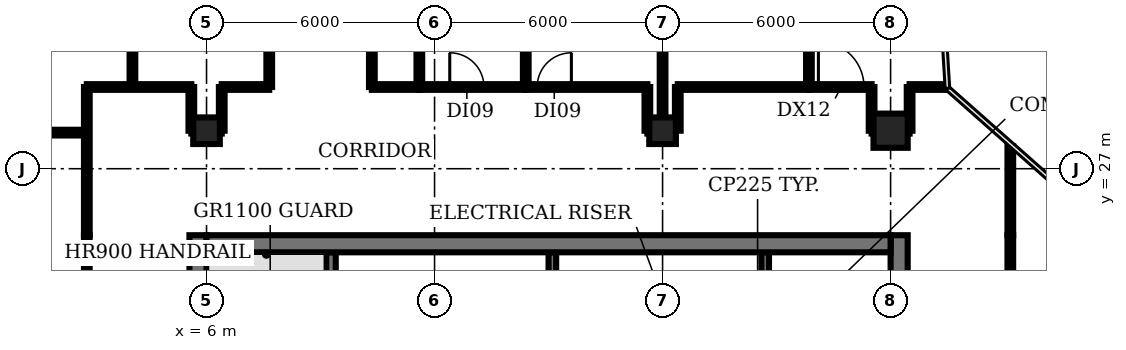
"""IFC4 building model, lengths in metres.
Left out: names, types, materials, properties, quantities, classifications, styles, units other than length and angle.
Written with IfcOpenShell. Run it as: python <this file> out.ifc"""

import sys

from ifc_helpers import new_model, si_unit, direction, frame, frame_2d, origin, origin_2d, place, context, subcontext, project, spatial, rectangle, circle, extrude, element, fill, save


model = new_model("IFC4")
c1 = context("Model", 3, precision=1e-05, world=origin(), true_north=direction((0.0, 1.0)))
c2 = subcontext(c1, "Body", "Model", "MODEL_VIEW")
j1 = project(units=[si_unit("LENGTHUNIT", "METRE"), si_unit("PLANEANGLEUNIT", "RADIAN")], contexts=[c1])
p1 = place(None, origin())
s1 = spatial("IfcSite", under=j1, at=p1, CompositionType="ELEMENT")
p2 = place(p1, origin())
s2 = spatial("IfcBuilding", under=s1, at=p2, CompositionType="ELEMENT")
p3 = place(p2, frame((0.0, 0.0, 213.8)))
s3 = spatial("IfcBuildingStorey", under=s2, at=p3, CompositionType="ELEMENT", Elevation=213.8)
for number, where, z_axis, x_axis in (
    (1, (6.0, 28.0, 0.0), (0.0, 0.0, 1.0), (1.0, 0.0, 0.0)),
    (2, (18.0, 28.0, 0.0), (0.0, 0.0, 1.0), (1.0, 0.0, 0.0)),
):
    element("IfcColumn", number, at=place(p3, frame(where, z_axis=z_axis, x_axis=x_axis)), inside=s3, PredefinedType="COLUMN", context=c2, shape_type="SweptSolid", body=[
        extrude(rectangle(XDim=0.7, YDim=0.7, at=origin_2d()), origin(), (0.0, 0.0, 1.0), 3.85),
    ])
p4 = place(p3, frame((24.0, 28.0, 0.0), z_axis=(0.0, 0.0, 1.0), x_axis=(1.0, 0.0, 0.0)))
e3 = element("IfcColumn", 3, at=p4, inside=s3, PredefinedType="COLUMN", context=c2, shape_type="SweptSolid", body=[
    extrude(circle(Radius=0.45, at=origin_2d()), origin(), (0.0, 0.0, 1.0), 3.85),
])
p5 = place(p3, frame((9.275, 18.375, 0.0), z_axis=(0.0, 0.0, 1.0), x_axis=(0.0, 1.0, 0.0)))
e4 = element("IfcWall", 4, at=p5, inside=s3, PredefinedType="SHEAR", context=c2, shape_type="SweptSolid", body=[
    extrude(rectangle(XDim=6.425, YDim=0.25, at=frame_2d((3.212, 0.0))), origin(), (0.0, 0.0, 1.0), 3.85),
])
for number, where, z_axis, x_axis in (
    (5, (15.1, 22.9, 0.0), (0.0, 0.0, 1.0), (0.0, 1.0, 0.0)),
    (6, (20.7, 22.9, 0.0), (0.0, 0.0, 1.0), (0.0, 1.0, 0.0)),
):
    element("IfcWall", number, at=place(p3, frame(where, z_axis=z_axis, x_axis=x_axis)), inside=s3, PredefinedType="SHEAR", context=c2, shape_type="SweptSolid", body=[
        extrude(rectangle(XDim=1.9, YDim=0.2, at=frame_2d((0.95, 0.0))), origin(), (0.0, 0.0, 1.0), 3.85),
    ])
p6 = place(p3, frame((5.775, 4.42, 0.0), z_axis=(0.0, 0.0, 1.0), x_axis=(0.0, 1.0, 0.0)))
e7 = element("IfcWall", 7, at=p6, inside=s3, PredefinedType="SHEAR", context=c2, shape_type="SweptSolid", body=[
    extrude(rectangle(XDim=20.83, YDim=0.45, at=frame_2d((10.415, 0.0))), origin(), (0.0, 0.0, 1.0), 3.85),
])
p7 = place(p6, frame((1.23, 0.0, 0.0)))
e8 = element("IfcOpeningElement", 8, at=p7, cuts=e7, PredefinedType="OPENING", context=c2, shape_type="SweptSolid", body=[
    extrude(rectangle(XDim=1.5, YDim=2.1, at=frame_2d((0.75, 1.05))), frame((0.0, 0.235, 0.0), z_axis=(0.0, -1.0, 0.0), x_axis=(1.0, 0.0, 0.0)), (0.0, 0.0, 1.0), 0.47),
])
p8 = place(p6, frame((7.68, 0.0, 0.0)))
e9 = element("IfcOpeningElement", 9, at=p8, cuts=e7, PredefinedType="OPENING", context=c2, shape_type="SweptSolid", body=[
    extrude(rectangle(XDim=1.2, YDim=2.1, at=frame_2d((0.6, 1.05))), frame((0.0, 0.235, 0.0), z_axis=(0.0, -1.0, 0.0), x_axis=(1.0, 0.0, 0.0)), (0.0, 0.0, 1.0), 0.47),
])
p9 = place(p6, frame((14.23, 0.0, 0.0)))
e10 = element("IfcOpeningElement", 10, at=p9, cuts=e7, PredefinedType="OPENING", context=c2, shape_type="SweptSolid", body=[
    extrude(rectangle(XDim=1.2, YDim=2.1, at=frame_2d((0.6, 1.05))), frame((0.0, 0.235, 0.0), z_axis=(0.0, -1.0, 0.0), x_axis=(1.0, 0.0, 0.0)), (0.0, 0.0, 1.0), 0.47),
])
p10 = place(p3, frame((24.225, 25.25, 0.0), z_axis=(0.0, 0.0, 1.0), x_axis=(0.0, -1.0, 0.0)))
e11 = element("IfcWall", 11, at=p10, inside=s3, PredefinedType="SHEAR", context=c2, shape_type="SweptSolid", body=[
    extrude(rectangle(XDim=20.83, YDim=0.45, at=frame_2d((10.415, 0.0))), origin(), (0.0, 0.0, 1.0), 3.85),
])
p11 = place(p10, frame((18.1, 0.0, 0.0)))
e12 = element("IfcOpeningElement", 12, at=p11, cuts=e11, PredefinedType="OPENING", context=c2, shape_type="SweptSolid", body=[
    extrude(rectangle(XDim=1.5, YDim=2.1, at=frame_2d((0.75, 1.05))), frame((0.0, 0.235, 0.0), z_axis=(0.0, -1.0, 0.0), x_axis=(1.0, 0.0, 0.0)), (0.0, 0.0, 1.0), 0.47),
])
p12 = place(p10, frame((12.0, 0.0, 0.0)))
e13 = element("IfcOpeningElement", 13, at=p12, cuts=e11, PredefinedType="OPENING", context=c2, shape_type="SweptSolid", body=[
    extrude(rectangle(XDim=0.9, YDim=2.1, at=frame_2d((0.45, 1.05))), frame((0.0, 0.235, 0.0), z_axis=(0.0, -1.0, 0.0), x_axis=(1.0, 0.0, 0.0)), (0.0, 0.0, 1.0), 0.47),
])
p13 = place(p10, frame((6.0, 0.0, 0.0)))
e14 = element("IfcOpeningElement", 14, at=p13, cuts=e11, PredefinedType="OPENING", context=c2, shape_type="SweptSolid", body=[
    extrude(rectangle(XDim=2.0, YDim=2.1, at=frame_2d((1.0, 1.05))), frame((0.0, 0.235, 0.0), z_axis=(0.0, -1.0, 0.0), x_axis=(1.0, 0.0, 0.0)), (0.0, 0.0, 1.0), 0.47),
])
p14 = place(p3, frame((6.0, 25.025, 0.0), z_axis=(0.0, 0.0, 1.0), x_axis=(1.0, 0.0, 0.0)))
e15 = element("IfcWall", 15, at=p14, inside=s3, PredefinedType="SHEAR", context=c2, shape_type="SweptSolid", body=[
    extrude(rectangle(XDim=18.0, YDim=0.45, at=frame_2d((9.0, 0.0))), origin(), (0.0, 0.0, 1.0), 3.85),
])
p15 = place(p3, frame((-0.965, 27.95, 0.0), z_axis=(0.0, 0.0, 1.0), x_axis=(1.0, 0.0, 0.0)))
e16 = element("IfcWall", 16, at=p15, inside=s3, PredefinedType="PARTITIONING", context=c2, shape_type="SweptSolid", body=[
    extrude(rectangle(XDim=3.815, YDim=0.15, at=frame_2d((1.908, 0.0))), origin(), (0.0, 0.0, 1.0), 2.88),
])
p16 = place(p3, frame((2.85, 5.77, 0.0), z_axis=(0.0, 0.0, 1.0), x_axis=(0.0, 1.0, 0.0)))
e17 = element("IfcWall", 17, at=p16, inside=s3, PredefinedType="PARTITIONING", context=c2, shape_type="SweptSolid", body=[
    extrude(rectangle(XDim=19.48, YDim=0.15, at=frame_2d((9.74, 0.0))), origin(), (0.0, 0.0, 1.0), 2.88),
])
p17 = place(p16, frame((8.48, 0.0, 0.0)))
e18 = element("IfcOpeningElement", 18, at=p17, cuts=e17, PredefinedType="OPENING", context=c2, shape_type="SweptSolid", body=[
    extrude(rectangle(XDim=1.2, YDim=2.1, at=frame_2d((0.6, 1.05))), frame((0.0, 0.085, 0.0), z_axis=(0.0, -1.0, 0.0), x_axis=(1.0, 0.0, 0.0)), (0.0, 0.0, 1.0), 0.17),
])
p18 = place(p3, frame((2.85, 25.25, 0.0), z_axis=(0.0, 0.0, 1.0), x_axis=(0.0, 1.0, 0.0)))
e19 = element("IfcWall", 19, at=p18, inside=s3, PredefinedType="PARTITIONING", context=c2, shape_type="SweptSolid", body=[
    extrude(rectangle(XDim=3.9, YDim=0.15, at=frame_2d((1.95, 0.0))), origin(), (0.0, 0.0, 1.0), 2.88),
])
p19 = place(p3, frame((2.85, 29.15, 0.0), z_axis=(0.0, 0.0, 1.0), x_axis=(1.0, 0.0, 0.0)))
e20 = element("IfcWall", 20, at=p19, inside=s3, PredefinedType="PARTITIONING", context=c2, shape_type="SweptSolid", body=[
    extrude(rectangle(XDim=2.75, YDim=0.15, at=frame_2d((1.375, 0.0))), origin(), (0.0, 0.0, 1.0), 2.88),
])
p20 = place(p3, frame((4.05, 29.15, 0.0), z_axis=(0.0, 0.0, 1.0), x_axis=(0.0, 1.0, 0.0)))
e21 = element("IfcWall", 21, at=p20, inside=s3, PredefinedType="PARTITIONING", context=c2, shape_type="SweptSolid", body=[
    extrude(rectangle(XDim=4.8, YDim=0.15, at=frame_2d((2.4, 0.0))), origin(), (0.0, 0.0, 1.0), 2.88),
])
p21 = place(p3, frame((5.6, 28.0, 0.0), z_axis=(0.0, 0.0, 1.0), x_axis=(0.0, 1.0, 0.0)))
e22 = element("IfcWall", 22, at=p21, inside=s3, PredefinedType="PARTITIONING", context=c2, shape_type="SweptSolid", body=[
    extrude(rectangle(XDim=1.15, YDim=0.15, at=frame_2d((0.575, 0.0))), origin(), (0.0, 0.0, 1.0), 2.88),
])
p22 = place(p3, frame((5.6, 28.0, 0.0), z_axis=(0.0, 0.0, 1.0), x_axis=(1.0, 0.0, 0.0)))
e23 = element("IfcWall", 23, at=p22, inside=s3, PredefinedType="PARTITIONING", context=c2, shape_type="SweptSolid", body=[
    extrude(rectangle(XDim=0.8, YDim=0.15, at=frame_2d((0.4, 0.0))), origin(), (0.0, 0.0, 1.0), 2.88),
])
p23 = place(p3, frame((6.4, 28.0, 0.0), z_axis=(0.0, 0.0, 1.0), x_axis=(0.0, 1.0, 0.0)))
e24 = element("IfcWall", 24, at=p23, inside=s3, PredefinedType="PARTITIONING", context=c2, shape_type="SweptSolid", body=[
    extrude(rectangle(XDim=1.15, YDim=0.15, at=frame_2d((0.575, 0.0))), origin(), (0.0, 0.0, 1.0), 2.88),
])
p24 = place(p3, frame((6.4, 29.15, 0.0), z_axis=(0.0, 0.0, 1.0), x_axis=(1.0, 0.0, 0.0)))
e25 = element("IfcWall", 25, at=p24, inside=s3, PredefinedType="PARTITIONING", context=c2, shape_type="SweptSolid", body=[
    extrude(rectangle(XDim=1.25, YDim=0.15, at=frame_2d((0.625, 0.0))), origin(), (0.0, 0.0, 1.0), 2.88),
])
p25 = place(p3, frame((7.65, 29.15, 0.0), z_axis=(0.0, 0.0, 1.0), x_axis=(0.0, 1.0, 0.0)))
e26 = element("IfcWall", 26, at=p25, inside=s3, PredefinedType="PARTITIONING", context=c2, shape_type="SweptSolid", body=[
    extrude(rectangle(XDim=4.8, YDim=0.15, at=frame_2d((2.4, 0.0))), origin(), (0.0, 0.0, 1.0), 2.88),
])
p26 = place(p25, frame((1.9, 0.0, 0.0)))
e27 = element("IfcOpeningElement", 27, at=p26, cuts=e26, PredefinedType="OPENING", context=c2, shape_type="SweptSolid", body=[
    extrude(rectangle(XDim=0.9, YDim=2.1, at=frame_2d((0.45, 1.05))), frame((0.0, 0.085, 0.0), z_axis=(0.0, -1.0, 0.0), x_axis=(1.0, 0.0, 0.0)), (0.0, 0.0, 1.0), 0.17),
])
p27 = place(p3, frame((10.35, 29.15, 0.0), z_axis=(0.0, 0.0, 1.0), x_axis=(0.0, 1.0, 0.0)))
e28 = element("IfcWall", 28, at=p27, inside=s3, PredefinedType="PARTITIONING", context=c2, shape_type="SweptSolid", body=[
    extrude(rectangle(XDim=4.8, YDim=0.15, at=frame_2d((2.4, 0.0))), origin(), (0.0, 0.0, 1.0), 2.88),
])
p28 = place(p3, frame((10.35, 29.15, 0.0), z_axis=(0.0, 0.0, 1.0), x_axis=(1.0, 0.0, 0.0)))
e29 = element("IfcWall", 29, at=p28, inside=s3, PredefinedType="PARTITIONING", context=c2, shape_type="SweptSolid", body=[
    extrude(rectangle(XDim=1.25, YDim=0.15, at=frame_2d((0.625, 0.0))), origin(), (0.0, 0.0, 1.0), 2.88),
])
p29 = place(p3, frame((11.6, 29.15, 0.0), z_axis=(0.0, 0.0, 1.0), x_axis=(0.0, 1.0, 0.0)))
e30 = element("IfcWall", 30, at=p29, inside=s3, PredefinedType="PARTITIONING", context=c2, shape_type="SweptSolid", body=[
    extrude(rectangle(XDim=4.72, YDim=0.15, at=frame_2d((2.36, 0.0))), origin(), (0.0, 0.0, 1.0), 2.88),
])
p30 = place(p3, frame((11.6, 29.15, 0.0), z_axis=(0.0, 0.0, 1.0), x_axis=(1.0, 0.0, 0.0)))
e31 = element("IfcWall", 31, at=p30, inside=s3, PredefinedType="PARTITIONING", context=c2, shape_type="SweptSolid", body=[
    extrude(rectangle(XDim=2.8, YDim=0.15, at=frame_2d((1.4, 0.0))), origin(), (0.0, 0.0, 1.0), 2.88),
])
p31 = place(p30, frame((0.8, 0.0, 0.0)))
e32 = element("IfcOpeningElement", 32, at=p31, cuts=e31, PredefinedType="OPENING", context=c2, shape_type="SweptSolid", body=[
    extrude(rectangle(XDim=0.9, YDim=2.1, at=frame_2d((0.45, 1.05))), frame((0.0, 0.085, 0.0), z_axis=(0.0, -1.0, 0.0), x_axis=(1.0, 0.0, 0.0)), (0.0, 0.0, 1.0), 0.17),
])
p32 = place(p3, frame((14.4, 29.15, 0.0), z_axis=(0.0, 0.0, 1.0), x_axis=(0.0, 1.0, 0.0)))
e33 = element("IfcWall", 33, at=p32, inside=s3, PredefinedType="PARTITIONING", context=c2, shape_type="SweptSolid", body=[
    extrude(rectangle(XDim=4.8, YDim=0.15, at=frame_2d((2.4, 0.0))), origin(), (0.0, 0.0, 1.0), 2.88),
])
p33 = place(p3, frame((14.4, 29.15, 0.0), z_axis=(0.0, 0.0, 1.0), x_axis=(1.0, 0.0, 0.0)))
e34 = element("IfcWall", 34, at=p33, inside=s3, PredefinedType="PARTITIONING", context=c2, shape_type="SweptSolid", body=[
    extrude(rectangle(XDim=3.2, YDim=0.15, at=frame_2d((1.6, 0.0))), origin(), (0.0, 0.0, 1.0), 2.88),
])
p34 = place(p33, frame((0.3, 0.0, 0.0)))
e35 = element("IfcOpeningElement", 35, at=p34, cuts=e34, PredefinedType="OPENING", context=c2, shape_type="SweptSolid", body=[
    extrude(rectangle(XDim=0.9, YDim=2.1, at=frame_2d((0.45, 1.05))), frame((0.0, 0.085, 0.0), z_axis=(0.0, -1.0, 0.0), x_axis=(1.0, 0.0, 0.0)), (0.0, 0.0, 1.0), 0.17),
])
p35 = place(p3, frame((17.6, 28.0, 0.0), z_axis=(0.0, 0.0, 1.0), x_axis=(0.0, 1.0, 0.0)))
e36 = element("IfcWall", 36, at=p35, inside=s3, PredefinedType="PARTITIONING", context=c2, shape_type="SweptSolid", body=[
    extrude(rectangle(XDim=1.15, YDim=0.15, at=frame_2d((0.575, 0.0))), origin(), (0.0, 0.0, 1.0), 2.88),
])
p36 = place(p3, frame((17.6, 28.0, 0.0), z_axis=(0.0, 0.0, 1.0), x_axis=(1.0, 0.0, 0.0)))
e37 = element("IfcWall", 37, at=p36, inside=s3, PredefinedType="PARTITIONING", context=c2, shape_type="SweptSolid", body=[
    extrude(rectangle(XDim=0.4, YDim=0.15, at=frame_2d((0.2, 0.0))), origin(), (0.0, 0.0, 1.0), 2.88),
])
p37 = place(p3, frame((18.0, 28.0, 0.0), z_axis=(0.0, 0.0, 1.0), x_axis=(0.0, 1.0, 0.0)))
e38 = element("IfcWall", 38, at=p37, inside=s3, PredefinedType="PARTITIONING", context=c2, shape_type="SweptSolid", body=[
    extrude(rectangle(XDim=5.95, YDim=0.15, at=frame_2d((2.975, 0.0))), origin(), (0.0, 0.0, 1.0), 2.88),
])
p38 = place(p3, frame((18.4, 28.0, 0.0), z_axis=(0.0, 0.0, 1.0), x_axis=(0.0, 1.0, 0.0)))
e39 = element("IfcWall", 39, at=p38, inside=s3, PredefinedType="PARTITIONING", context=c2, shape_type="SweptSolid", body=[
    extrude(rectangle(XDim=1.15, YDim=0.15, at=frame_2d((0.575, 0.0))), origin(), (0.0, 0.0, 1.0), 2.88),
])
p39 = place(p3, frame((18.4, 29.15, 0.0), z_axis=(0.0, 0.0, 1.0), x_axis=(1.0, 0.0, 0.0)))
e40 = element("IfcWall", 40, at=p39, inside=s3, PredefinedType="PARTITIONING", context=c2, shape_type="SweptSolid", body=[
    extrude(rectangle(XDim=3.45, YDim=0.15, at=frame_2d((1.725, 0.0))), origin(), (0.0, 0.0, 1.0), 2.88),
])
p40 = place(p3, frame((21.85, 29.15, 0.0), z_axis=(0.0, 0.0, 1.0), x_axis=(0.0, 1.0, 0.0)))
e41 = element("IfcWall", 41, at=p40, inside=s3, PredefinedType="PARTITIONING", context=c2, shape_type="SweptSolid", body=[
    extrude(rectangle(XDim=4.8, YDim=0.15, at=frame_2d((2.4, 0.0))), origin(), (0.0, 0.0, 1.0), 2.88),
])
p41 = place(p3, frame((21.85, 29.15, 0.0), z_axis=(0.0, 0.0, 1.0), x_axis=(1.0, 0.0, 0.0)))
e42 = element("IfcWall", 42, at=p41, inside=s3, PredefinedType="PARTITIONING", context=c2, shape_type="SweptSolid", body=[
    extrude(rectangle(XDim=1.65, YDim=0.15, at=frame_2d((0.825, 0.0))), origin(), (0.0, 0.0, 1.0), 2.88),
])
p42 = place(p41, frame((0.25, 0.0, 0.0)))
e43 = element("IfcOpeningElement", 43, at=p42, cuts=e42, PredefinedType="OPENING", context=c2, shape_type="SweptSolid", body=[
    extrude(rectangle(XDim=1.2, YDim=2.1, at=frame_2d((0.6, 1.05))), frame((0.0, 0.085, 0.0), z_axis=(0.0, -1.0, 0.0), x_axis=(1.0, 0.0, 0.0)), (0.0, 0.0, 1.0), 0.17),
])
p43 = place(p3, frame((23.5, 28.0, 0.0), z_axis=(0.0, 0.0, 1.0), x_axis=(0.0, 1.0, 0.0)))
e44 = element("IfcWall", 44, at=p43, inside=s3, PredefinedType="PARTITIONING", context=c2, shape_type="SweptSolid", body=[
    extrude(rectangle(XDim=1.15, YDim=0.15, at=frame_2d((0.575, 0.0))), origin(), (0.0, 0.0, 1.0), 2.88),
])
p44 = place(p3, frame((23.5, 28.0, 0.0), z_axis=(0.0, 0.0, 1.0), x_axis=(1.0, 0.0, 0.0)))
e45 = element("IfcWall", 45, at=p44, inside=s3, PredefinedType="PARTITIONING", context=c2, shape_type="SweptSolid", body=[
    extrude(rectangle(XDim=1.0, YDim=0.15, at=frame_2d((0.5, 0.0))), origin(), (0.0, 0.0, 1.0), 2.88),
])
p45 = place(p3, frame((24.5, 28.0, 0.0), z_axis=(0.0, 0.0, 1.0), x_axis=(0.0, 1.0, 0.0)))
e46 = element("IfcWall", 46, at=p45, inside=s3, PredefinedType="PARTITIONING", context=c2, shape_type="SweptSolid", body=[
    extrude(rectangle(XDim=1.15, YDim=0.15, at=frame_2d((0.575, 0.0))), origin(), (0.0, 0.0, 1.0), 2.88),
])
p46 = place(p3, frame((24.5, 29.15, 0.0), z_axis=(0.0, 0.0, 1.0), x_axis=(1.0, 0.0, 0.0)))
e47 = element("IfcWall", 47, at=p46, inside=s3, PredefinedType="PARTITIONING", context=c2, shape_type="SweptSolid", body=[
    extrude(rectangle(XDim=0.933, YDim=0.15, at=frame_2d((0.467, 0.0))), origin(), (0.0, 0.0, 1.0), 2.88),
])
p47 = place(p3, frame((27.15, 25.25, 0.0), z_axis=(0.0, 0.0, 1.0), x_axis=(0.0, -1.0, 0.0)))
e48 = element("IfcWall", 48, at=p47, inside=s3, PredefinedType="PARTITIONING", context=c2, shape_type="SweptSolid", body=[
    extrude(rectangle(XDim=5.85, YDim=0.15, at=frame_2d((2.925, 0.0))), origin(), (0.0, 0.0, 1.0), 2.88),
])
p48 = place(p47, frame((1.45, 0.0, 0.0)))
e49 = element("IfcOpeningElement", 49, at=p48, cuts=e48, PredefinedType="OPENING", context=c2, shape_type="SweptSolid", body=[
    extrude(rectangle(XDim=1.2, YDim=2.1, at=frame_2d((0.6, 1.05))), frame((0.0, 0.085, 0.0), z_axis=(0.0, -1.0, 0.0), x_axis=(1.0, 0.0, 0.0)), (0.0, 0.0, 1.0), 0.17),
])
p49 = place(p3, frame((27.15, 25.25, 0.0), z_axis=(0.0, 0.0, 1.0), x_axis=(0.0, 1.0, 0.0)))
e50 = element("IfcWall", 50, at=p49, inside=s3, PredefinedType="PARTITIONING", context=c2, shape_type="SweptSolid", body=[
    extrude(rectangle(XDim=2.34, YDim=0.15, at=frame_2d((1.17, 0.0))), origin(), (0.0, 0.0, 1.0), 2.88),
])
p50 = place(p31, origin())
e51 = element("IfcDoor", 51, at=p50, inside=s3, OperationType="SINGLE_SWING_LEFT", PredefinedType="DOOR", context=c2, shape_type="SweptSolid", body=[
    extrude(rectangle(XDim=0.9, YDim=2.1, at=frame_2d((0.45, 1.05))), frame((0.0, 0.025, 0.0), z_axis=(0.0, -1.0, 0.0), x_axis=(1.0, 0.0, 0.0)), (0.0, 0.0, 1.0), 0.05),
])
fill(e32, e51)
p51 = place(p34, origin())
e52 = element("IfcDoor", 52, at=p51, inside=s3, OperationType="SINGLE_SWING_RIGHT", PredefinedType="DOOR", context=c2, shape_type="SweptSolid", body=[
    extrude(rectangle(XDim=0.9, YDim=2.1, at=frame_2d((0.45, 1.05))), frame((0.0, 0.025, 0.0), z_axis=(0.0, -1.0, 0.0), x_axis=(1.0, 0.0, 0.0)), (0.0, 0.0, 1.0), 0.05),
])
fill(e35, e52)
p52 = place(p42, origin())
e53 = element("IfcDoor", 53, at=p52, inside=s3, OperationType="SINGLE_SWING_LEFT", PredefinedType="DOOR", context=c2, shape_type="SweptSolid", body=[
    extrude(rectangle(XDim=1.2, YDim=2.1, at=frame_2d((0.6, 1.05))), frame((0.0, 0.025, 0.0), z_axis=(0.0, -1.0, 0.0), x_axis=(1.0, 0.0, 0.0)), (0.0, 0.0, 1.0), 0.05),
])
fill(e43, e53)
save(model, sys.argv[1])
